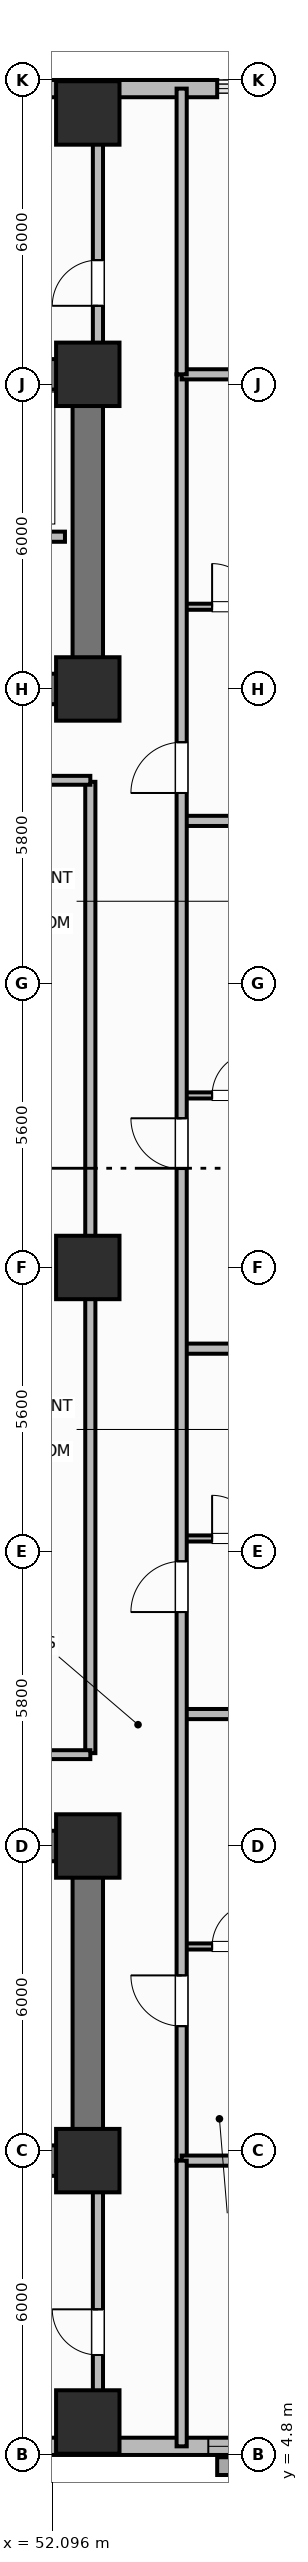
"""IFC4 building model, lengths in metres.
Left out: names, types, materials, properties, quantities, classifications, styles, units other than length and angle.
Written with IfcOpenShell. Run it as: python <this file> out.ifc"""

import sys

from ifc_helpers import new_model, si_unit, direction, frame, frame_2d, origin, origin_2d, place, context, subcontext, project, spatial, rectangle, extrude, element, fill, save


model = new_model("IFC4")
c1 = context("Model", 3, precision=1e-05, world=origin(), true_north=direction((0.0, 1.0)))
c2 = subcontext(c1, "Body", "Model", "MODEL_VIEW")
j1 = project(units=[si_unit("LENGTHUNIT", "METRE"), si_unit("PLANEANGLEUNIT", "RADIAN")], contexts=[c1])
p1 = place(None, origin())
s1 = spatial("IfcSite", under=j1, at=p1, CompositionType="ELEMENT")
p2 = place(p1, origin())
s2 = spatial("IfcBuilding", under=s1, at=p2, CompositionType="ELEMENT")
p3 = place(p2, frame((0.0, 0.0, 58.4)))
s3 = spatial("IfcBuildingStorey", under=s2, at=p3, CompositionType="ELEMENT", Elevation=58.4)
p4 = place(p3, frame((52.8, 10.6, 0.0), z_axis=(0.0, 0.0, 1.0), x_axis=(-1.0, 0.0, 0.0)))
e1 = element("IfcWall", 1, at=p4, inside=s3, PredefinedType="SHEAR", context=c2, shape_type="SweptSolid", body=[
    extrude(rectangle(XDim=27.2, YDim=0.6, at=frame_2d((13.6, 0.0))), origin(), (0.0, 0.0, 1.0), 3.7),
])
p5 = place(p3, frame((52.8, 10.9, 0.0), z_axis=(0.0, 0.0, 1.0), x_axis=(0.0, 1.0, 0.0)))
e2 = element("IfcWall", 2, at=p5, inside=s3, PredefinedType="SHEAR", context=c2, shape_type="SweptSolid", body=[
    extrude(rectangle(XDim=5.6, YDim=0.6, at=frame_2d((2.8, 0.0))), origin(), (0.0, 0.0, 1.0), 3.7),
])
p6 = place(p3, frame((25.6, 16.8, 0.0), z_axis=(0.0, 0.0, 1.0), x_axis=(1.0, 0.0, 0.0)))
e3 = element("IfcWall", 3, at=p6, inside=s3, PredefinedType="SHEAR", context=c2, shape_type="SweptSolid", body=[
    extrude(rectangle(XDim=27.2, YDim=0.6, at=frame_2d((13.6, 0.0))), origin(), (0.0, 0.0, 1.0), 3.7),
])
p7 = place(p6, frame((1.9, 0.0, 0.0)))
e4 = element("IfcOpeningElement", 4, at=p7, cuts=e3, PredefinedType="OPENING", context=c2, shape_type="SweptSolid", body=[
    extrude(rectangle(XDim=1.1, YDim=2.15, at=frame_2d((0.55, 1.075))), frame((0.0, 0.31, 0.0), z_axis=(0.0, -1.0, 0.0), x_axis=(1.0, 0.0, 0.0)), (0.0, 0.0, 1.0), 0.62),
])
p8 = place(p6, frame((13.0, 0.0, 0.0)))
e5 = element("IfcOpeningElement", 5, at=p8, cuts=e3, PredefinedType="OPENING", context=c2, shape_type="SweptSolid", body=[
    extrude(rectangle(XDim=1.2, YDim=2.15, at=frame_2d((0.6, 1.075))), frame((0.0, 0.31, 0.0), z_axis=(0.0, -1.0, 0.0), x_axis=(1.0, 0.0, 0.0)), (0.0, 0.0, 1.0), 0.62),
])
p9 = place(p6, frame((20.4, 0.0, 0.0)))
e6 = element("IfcOpeningElement", 6, at=p9, cuts=e3, PredefinedType="OPENING", context=c2, shape_type="SweptSolid", body=[
    extrude(rectangle(XDim=1.3, YDim=2.2, at=frame_2d((0.65, 1.1))), frame((0.0, 0.31, 0.0), z_axis=(0.0, -1.0, 0.0), x_axis=(1.0, 0.0, 0.0)), (0.0, 0.0, 1.0), 0.62),
])
p10 = place(p6, frame((24.65, 0.0, 0.0)))
e7 = element("IfcOpeningElement", 7, at=p10, cuts=e3, PredefinedType="OPENING", context=c2, shape_type="SweptSolid", body=[
    extrude(rectangle(XDim=0.85, YDim=2.1, at=frame_2d((0.425, 1.05))), frame((0.0, 0.31, 0.0), z_axis=(0.0, -1.0, 0.0), x_axis=(1.0, 0.0, 0.0)), (0.0, 0.0, 1.0), 0.62),
])
p11 = place(p3, frame((25.6, 45.8, 0.0), z_axis=(0.0, 0.0, 1.0), x_axis=(1.0, 0.0, 0.0)))
e8 = element("IfcWall", 8, at=p11, inside=s3, PredefinedType="SHEAR", context=c2, shape_type="SweptSolid", body=[
    extrude(rectangle(XDim=27.2, YDim=0.6, at=frame_2d((13.6, 0.0))), origin(), (0.0, 0.0, 1.0), 3.7),
])
p12 = place(p3, frame((52.8, 39.9, 0.0), z_axis=(0.0, 0.0, 1.0), x_axis=(0.0, 1.0, 0.0)))
e9 = element("IfcWall", 9, at=p12, inside=s3, PredefinedType="SHEAR", context=c2, shape_type="SweptSolid", body=[
    extrude(rectangle(XDim=5.6, YDim=0.6, at=frame_2d((2.8, 0.0))), origin(), (0.0, 0.0, 1.0), 3.7),
])
p13 = place(p3, frame((52.8, 39.6, 0.0), z_axis=(0.0, 0.0, 1.0), x_axis=(-1.0, 0.0, 0.0)))
e10 = element("IfcWall", 10, at=p13, inside=s3, PredefinedType="SHEAR", context=c2, shape_type="SweptSolid", body=[
    extrude(rectangle(XDim=27.2, YDim=0.6, at=frame_2d((13.6, 0.0))), origin(), (0.0, 0.0, 1.0), 3.7),
])
p14 = place(p13, frame((24.2, 0.0, 0.0)))
e11 = element("IfcOpeningElement", 11, at=p14, cuts=e10, PredefinedType="OPENING", context=c2, shape_type="SweptSolid", body=[
    extrude(rectangle(XDim=1.1, YDim=2.15, at=frame_2d((0.55, 1.075))), frame((0.0, 0.31, 0.0), z_axis=(0.0, -1.0, 0.0), x_axis=(1.0, 0.0, 0.0)), (0.0, 0.0, 1.0), 0.62),
])
p15 = place(p13, frame((15.1, 0.0, 0.0)))
e12 = element("IfcOpeningElement", 12, at=p15, cuts=e10, PredefinedType="OPENING", context=c2, shape_type="SweptSolid", body=[
    extrude(rectangle(XDim=1.2, YDim=2.15, at=frame_2d((0.6, 1.075))), frame((0.0, 0.31, 0.0), z_axis=(0.0, -1.0, 0.0), x_axis=(1.0, 0.0, 0.0)), (0.0, 0.0, 1.0), 0.62),
])
p16 = place(p13, frame((11.6, 0.0, 0.0)))
e13 = element("IfcOpeningElement", 13, at=p16, cuts=e10, PredefinedType="OPENING", context=c2, shape_type="SweptSolid", body=[
    extrude(rectangle(XDim=0.9, YDim=2.1, at=frame_2d((0.45, 1.05))), frame((0.0, 0.31, 0.0), z_axis=(0.0, -1.0, 0.0), x_axis=(1.0, 0.0, 0.0)), (0.0, 0.0, 1.0), 0.62),
])
p17 = place(p13, frame((3.6, 0.0, 0.0)))
e14 = element("IfcOpeningElement", 14, at=p17, cuts=e10, PredefinedType="OPENING", context=c2, shape_type="SweptSolid", body=[
    extrude(rectangle(XDim=1.0, YDim=2.15, at=frame_2d((0.5, 1.075))), frame((0.0, 0.31, 0.0), z_axis=(0.0, -1.0, 0.0), x_axis=(1.0, 0.0, 0.0)), (0.0, 0.0, 1.0), 0.62),
])
for number, where, z_axis, x_axis in (
    (15, (52.8, 10.6, 0.0), (0.0, 0.0, 1.0), (1.0, 0.0, 0.0)),
    (16, (52.8, 16.8, 0.0), (0.0, 0.0, 1.0), (1.0, 0.0, 0.0)),
    (17, (52.8, 39.6, 0.0), (0.0, 0.0, 1.0), (1.0, 0.0, 0.0)),
    (18, (52.8, 45.8, 0.0), (0.0, 0.0, 1.0), (1.0, 0.0, 0.0)),
    (19, (52.8, 28.2, 0.0), (0.0, 0.0, 1.0), (1.0, 0.0, 0.0)),
    (20, (52.8, 5.45, 0.0), (0.0, 0.0, 1.0), (1.0, 0.0, 0.0)),
    (21, (52.8, 50.95, 0.0), (0.0, 0.0, 1.0), (1.0, 0.0, 0.0)),
):
    element("IfcColumn", number, at=place(p3, frame(where, z_axis=z_axis, x_axis=x_axis)), inside=s3, PredefinedType="COLUMN", context=c2, shape_type="SweptSolid", body=[
        extrude(rectangle(XDim=1.25, YDim=1.25, at=origin_2d()), origin(), (0.0, 0.0, 1.0), 3.7),
    ])
p18 = place(p3, frame((51.25, 4.97, 0.0), z_axis=(0.0, 0.0, 1.0), x_axis=(1.0, 0.0, 0.0)))
e22 = element("IfcWall", 22, at=p18, inside=s3, PredefinedType="SOLIDWALL", context=c2, shape_type="SweptSolid", body=[
    extrude(rectangle(XDim=8.55, YDim=0.34, at=frame_2d((4.275, 0.0))), origin(), (0.0, 0.0, 1.0), 2.7),
])
p19 = place(p18, frame((3.925, 0.0, 0.68)))
e23 = element("IfcOpeningElement", 23, at=p19, cuts=e22, PredefinedType="OPENING", context=c2, shape_type="SweptSolid", body=[
    extrude(rectangle(XDim=2.1, YDim=1.9, at=frame_2d((1.05, 0.95))), frame((0.0, 0.18, 0.0), z_axis=(0.0, -1.0, 0.0), x_axis=(1.0, 0.0, 0.0)), (0.0, 0.0, 1.0), 0.36),
])
p20 = place(p3, frame((55.35, 51.43, 0.0), z_axis=(0.0, 0.0, 1.0), x_axis=(-1.0, 0.0, 0.0)))
e24 = element("IfcWall", 24, at=p20, inside=s3, PredefinedType="SOLIDWALL", context=c2, shape_type="SweptSolid", body=[
    extrude(rectangle(XDim=12.95, YDim=0.34, at=frame_2d((6.475, 0.0))), origin(), (0.0, 0.0, 1.0), 2.7),
])
p21 = place(p20, frame((5.775, 0.0, 0.73)))
e25 = element("IfcOpeningElement", 25, at=p21, cuts=e24, PredefinedType="OPENING", context=c2, shape_type="SweptSolid", body=[
    extrude(rectangle(XDim=1.4, YDim=1.85, at=frame_2d((0.7, 0.925))), frame((0.0, 0.18, 0.0), z_axis=(0.0, -1.0, 0.0), x_axis=(1.0, 0.0, 0.0)), (0.0, 0.0, 1.0), 0.36),
])
p22 = place(p20, frame((9.308, 0.0, 0.73)))
e26 = element("IfcOpeningElement", 26, at=p22, cuts=e24, PredefinedType="OPENING", context=c2, shape_type="SweptSolid", body=[
    extrude(rectangle(XDim=1.4, YDim=1.85, at=frame_2d((0.7, 0.925))), frame((0.0, 0.18, 0.0), z_axis=(0.0, -1.0, 0.0), x_axis=(1.0, 0.0, 0.0)), (0.0, 0.0, 1.0), 0.36),
])
p23 = place(p3, frame((52.35, 42.6, 0.0), z_axis=(0.0, 0.0, 1.0), x_axis=(-1.0, 0.0, 0.0)))
e27 = element("IfcWall", 27, at=p23, inside=s3, PredefinedType="PARTITIONING", context=c2, shape_type="SweptSolid", body=[
    extrude(rectangle(XDim=8.8, YDim=0.2, at=frame_2d((4.4, 0.0))), origin(), (0.0, 0.0, 1.0), 2.53),
])
p24 = place(p3, frame((52.85, 18.63, 0.0), z_axis=(0.0, 0.0, 1.0), x_axis=(0.0, 1.0, 0.0)))
e28 = element("IfcWall", 28, at=p24, inside=s3, PredefinedType="PARTITIONING", context=c2, shape_type="SweptSolid", body=[
    extrude(rectangle(XDim=19.14, YDim=0.2, at=frame_2d((9.57, 0.0))), origin(), (0.0, 0.0, 1.0), 2.53),
])
for number, where, z_axis, x_axis in (
    (29, (42.75, 18.6, 0.0), (0.0, 0.0, 1.0), (1.0, 0.0, 0.0)),
    (30, (42.75, 37.8, 0.0), (0.0, 0.0, 1.0), (1.0, 0.0, 0.0)),
):
    element("IfcWall", number, at=place(p3, frame(where, z_axis=z_axis, x_axis=x_axis)), inside=s3, PredefinedType="PARTITIONING", context=c2, shape_type="SweptSolid", body=[
        extrude(rectangle(XDim=10.1, YDim=0.175, at=frame_2d((5.05, 0.0))), origin(), (0.0, 0.0, 1.0), 2.53),
    ])
p25 = place(p3, frame((54.65, 14.82, 0.0), z_axis=(0.0, 0.0, 1.0), x_axis=(1.0, 0.0, 0.0)))
e31 = element("IfcWall", 31, at=p25, inside=s3, PredefinedType="PARTITIONING", context=c2, shape_type="SweptSolid", body=[
    extrude(rectangle(XDim=2.25, YDim=0.12, at=frame_2d((1.125, 0.0))), origin(), (0.0, 0.0, 1.0), 2.53),
])
p26 = place(p25, frame((0.6, 0.0, 0.0)))
e32 = element("IfcOpeningElement", 32, at=p26, cuts=e31, PredefinedType="OPENING", context=c2, shape_type="SweptSolid", body=[
    extrude(rectangle(XDim=0.85, YDim=2.1, at=frame_2d((0.425, 1.05))), frame((0.0, 0.07, 0.0), z_axis=(0.0, -1.0, 0.0), x_axis=(1.0, 0.0, 0.0)), (0.0, 0.0, 1.0), 0.14),
])
p27 = place(p3, frame((54.65, 19.4, 0.0), z_axis=(0.0, 0.0, 1.0), x_axis=(1.0, 0.0, 0.0)))
e33 = element("IfcWall", 33, at=p27, inside=s3, PredefinedType="PARTITIONING", context=c2, shape_type="SweptSolid", body=[
    extrude(rectangle(XDim=9.18, YDim=0.2, at=frame_2d((4.59, 0.0))), origin(), (0.0, 0.0, 1.0), 2.53),
])
p28 = place(p3, frame((54.65, 22.86, 0.0), z_axis=(0.0, 0.0, 1.0), x_axis=(1.0, 0.0, 0.0)))
e34 = element("IfcWall", 34, at=p28, inside=s3, PredefinedType="PARTITIONING", context=c2, shape_type="SweptSolid", body=[
    extrude(rectangle(XDim=2.25, YDim=0.12, at=frame_2d((1.125, 0.0))), origin(), (0.0, 0.0, 1.0), 2.53),
])
p29 = place(p28, frame((0.6, 0.0, 0.0)))
e35 = element("IfcOpeningElement", 35, at=p29, cuts=e34, PredefinedType="OPENING", context=c2, shape_type="SweptSolid", body=[
    extrude(rectangle(XDim=0.85, YDim=2.1, at=frame_2d((0.425, 1.05))), frame((0.0, 0.07, 0.0), z_axis=(0.0, -1.0, 0.0), x_axis=(1.0, 0.0, 0.0)), (0.0, 0.0, 1.0), 0.14),
])
p30 = place(p3, frame((54.65, 26.6, 0.0), z_axis=(0.0, 0.0, 1.0), x_axis=(1.0, 0.0, 0.0)))
e36 = element("IfcWall", 36, at=p30, inside=s3, PredefinedType="PARTITIONING", context=c2, shape_type="SweptSolid", body=[
    extrude(rectangle(XDim=8.78, YDim=0.2, at=frame_2d((4.39, 0.0))), origin(), (0.0, 0.0, 1.0), 2.53),
])
p31 = place(p3, frame((54.65, 31.59, 0.0), z_axis=(0.0, 0.0, 1.0), x_axis=(1.0, 0.0, 0.0)))
e37 = element("IfcWall", 37, at=p31, inside=s3, PredefinedType="PARTITIONING", context=c2, shape_type="SweptSolid", body=[
    extrude(rectangle(XDim=2.25, YDim=0.12, at=frame_2d((1.125, 0.0))), origin(), (0.0, 0.0, 1.0), 2.53),
])
p32 = place(p31, frame((0.6, 0.0, 0.0)))
e38 = element("IfcOpeningElement", 38, at=p32, cuts=e37, PredefinedType="OPENING", context=c2, shape_type="SweptSolid", body=[
    extrude(rectangle(XDim=0.85, YDim=2.1, at=frame_2d((0.425, 1.05))), frame((0.0, 0.07, 0.0), z_axis=(0.0, -1.0, 0.0), x_axis=(1.0, 0.0, 0.0)), (0.0, 0.0, 1.0), 0.14),
])
p33 = place(p3, frame((54.65, 37.0, 0.0), z_axis=(0.0, 0.0, 1.0), x_axis=(1.0, 0.0, 0.0)))
e39 = element("IfcWall", 39, at=p33, inside=s3, PredefinedType="PARTITIONING", context=c2, shape_type="SweptSolid", body=[
    extrude(rectangle(XDim=9.18, YDim=0.2, at=frame_2d((4.59, 0.0))), origin(), (0.0, 0.0, 1.0), 2.53),
])
p34 = place(p3, frame((54.65, 41.22, 0.0), z_axis=(0.0, 0.0, 1.0), x_axis=(1.0, 0.0, 0.0)))
e40 = element("IfcWall", 40, at=p34, inside=s3, PredefinedType="PARTITIONING", context=c2, shape_type="SweptSolid", body=[
    extrude(rectangle(XDim=2.25, YDim=0.12, at=frame_2d((1.125, 0.0))), origin(), (0.0, 0.0, 1.0), 2.53),
])
p35 = place(p34, frame((0.6, 0.0, 0.0)))
e41 = element("IfcOpeningElement", 41, at=p35, cuts=e40, PredefinedType="OPENING", context=c2, shape_type="SweptSolid", body=[
    extrude(rectangle(XDim=0.85, YDim=2.1, at=frame_2d((0.425, 1.05))), frame((0.0, 0.07, 0.0), z_axis=(0.0, -1.0, 0.0), x_axis=(1.0, 0.0, 0.0)), (0.0, 0.0, 1.0), 0.14),
])
p36 = place(p3, frame((54.65, 10.6, 0.0), z_axis=(0.0, 0.0, 1.0), x_axis=(0.0, 1.0, 0.0)))
e42 = element("IfcWall", 42, at=p36, inside=s3, PredefinedType="PARTITIONING", context=c2, shape_type="SweptSolid", body=[
    extrude(rectangle(XDim=35.2, YDim=0.2, at=frame_2d((17.6, 0.0))), origin(), (0.0, 0.0, 1.0), 2.53),
])
p37 = place(p36, frame((2.65, 0.0, 0.0)))
e43 = element("IfcOpeningElement", 43, at=p37, cuts=e42, PredefinedType="OPENING", context=c2, shape_type="SweptSolid", body=[
    extrude(rectangle(XDim=1.0, YDim=2.15, at=frame_2d((0.5, 1.075))), frame((0.0, 0.11, 0.0), z_axis=(0.0, -1.0, 0.0), x_axis=(1.0, 0.0, 0.0)), (0.0, 0.0, 1.0), 0.22),
])
p38 = place(p36, frame((10.81, 0.0, 0.0)))
e44 = element("IfcOpeningElement", 44, at=p38, cuts=e42, PredefinedType="OPENING", context=c2, shape_type="SweptSolid", body=[
    extrude(rectangle(XDim=1.0, YDim=2.15, at=frame_2d((0.5, 1.075))), frame((0.0, 0.11, 0.0), z_axis=(0.0, -1.0, 0.0), x_axis=(1.0, 0.0, 0.0)), (0.0, 0.0, 1.0), 0.22),
])
p39 = place(p36, frame((19.54, 0.0, 0.0)))
e45 = element("IfcOpeningElement", 45, at=p39, cuts=e42, PredefinedType="OPENING", context=c2, shape_type="SweptSolid", body=[
    extrude(rectangle(XDim=1.0, YDim=2.15, at=frame_2d((0.5, 1.075))), frame((0.0, 0.11, 0.0), z_axis=(0.0, -1.0, 0.0), x_axis=(1.0, 0.0, 0.0)), (0.0, 0.0, 1.0), 0.22),
])
p40 = place(p36, frame((26.95, 0.0, 0.0)))
e46 = element("IfcOpeningElement", 46, at=p40, cuts=e42, PredefinedType="OPENING", context=c2, shape_type="SweptSolid", body=[
    extrude(rectangle(XDim=1.0, YDim=2.15, at=frame_2d((0.5, 1.075))), frame((0.0, 0.11, 0.0), z_axis=(0.0, -1.0, 0.0), x_axis=(1.0, 0.0, 0.0)), (0.0, 0.0, 1.0), 0.22),
])
for number, where, z_axis, x_axis in (
    (47, (54.65, 10.6, 0.0), (0.0, 0.0, 1.0), (1.0, 0.0, 0.0)),
    (48, (54.65, 45.8, 0.0), (0.0, 0.0, 1.0), (1.0, 0.0, 0.0)),
):
    element("IfcWall", number, at=place(p3, frame(where, z_axis=z_axis, x_axis=x_axis)), inside=s3, PredefinedType="PARTITIONING", context=c2, shape_type="SweptSolid", body=[
        extrude(rectangle(XDim=8.76, YDim=0.2, at=frame_2d((4.38, 0.0))), origin(), (0.0, 0.0, 1.0), 2.53),
    ])
p41 = place(p3, frame((54.65, 4.97, 0.0), z_axis=(0.0, 0.0, 1.0), x_axis=(0.0, 1.0, 0.0)))
e49 = element("IfcWall", 49, at=p41, inside=s3, PredefinedType="PARTITIONING", context=c2, shape_type="SweptSolid", body=[
    extrude(rectangle(XDim=5.63, YDim=0.2, at=frame_2d((2.815, 0.0))), origin(), (0.0, 0.0, 1.0), 2.53),
])
p42 = place(p3, frame((54.65, 45.8, 0.0), z_axis=(0.0, 0.0, 1.0), x_axis=(0.0, 1.0, 0.0)))
e50 = element("IfcWall", 50, at=p42, inside=s3, PredefinedType="PARTITIONING", context=c2, shape_type="SweptSolid", body=[
    extrude(rectangle(XDim=5.63, YDim=0.2, at=frame_2d((2.815, 0.0))), origin(), (0.0, 0.0, 1.0), 2.53),
])
p43 = place(p3, frame((53.0, 5.72, 0.0), z_axis=(0.0, 0.0, 1.0), x_axis=(0.0, 1.0, 0.0)))
e51 = element("IfcWall", 51, at=p43, inside=s3, PredefinedType="PARTITIONING", context=c2, shape_type="SweptSolid", body=[
    extrude(rectangle(XDim=4.58, YDim=0.2, at=frame_2d((2.29, 0.0))), origin(), (0.0, 0.0, 1.0), 2.53),
])
p44 = place(p43, frame((1.05, 0.0, 0.0)))
e52 = element("IfcOpeningElement", 52, at=p44, cuts=e51, PredefinedType="OPENING", context=c2, shape_type="SweptSolid", body=[
    extrude(rectangle(XDim=0.9, YDim=2.1, at=frame_2d((0.45, 1.05))), frame((0.0, 0.11, 0.0), z_axis=(0.0, -1.0, 0.0), x_axis=(1.0, 0.0, 0.0)), (0.0, 0.0, 1.0), 0.22),
])
p45 = place(p3, frame((53.0, 46.1, 0.0), z_axis=(0.0, 0.0, 1.0), x_axis=(0.0, 1.0, 0.0)))
e53 = element("IfcWall", 53, at=p45, inside=s3, PredefinedType="PARTITIONING", context=c2, shape_type="SweptSolid", body=[
    extrude(rectangle(XDim=4.58, YDim=0.2, at=frame_2d((2.29, 0.0))), origin(), (0.0, 0.0, 1.0), 2.53),
])
p46 = place(p45, frame((1.05, 0.0, 0.0)))
e54 = element("IfcOpeningElement", 54, at=p46, cuts=e53, PredefinedType="OPENING", context=c2, shape_type="SweptSolid", body=[
    extrude(rectangle(XDim=0.9, YDim=2.1, at=frame_2d((0.45, 1.05))), frame((0.0, 0.11, 0.0), z_axis=(0.0, -1.0, 0.0), x_axis=(1.0, 0.0, 0.0)), (0.0, 0.0, 1.0), 0.22),
])
p47 = place(p19, origin())
e55 = element("IfcWindow", 55, at=p47, inside=s3, PartitioningType="SINGLE_PANEL", PredefinedType="WINDOW", context=c2, shape_type="SweptSolid", body=[
    extrude(rectangle(XDim=2.1, YDim=1.9, at=frame_2d((1.05, 0.95))), frame((0.0, 0.03, 0.0), z_axis=(0.0, -1.0, 0.0), x_axis=(1.0, 0.0, 0.0)), (0.0, 0.0, 1.0), 0.06),
])
fill(e23, e55)
p48 = place(p26, origin())
e56 = element("IfcDoor", 56, at=p48, inside=s3, OperationType="SINGLE_SWING_RIGHT", PredefinedType="DOOR", context=c2, shape_type="SweptSolid", body=[
    extrude(rectangle(XDim=0.85, YDim=2.1, at=frame_2d((0.425, 1.05))), frame((0.0, 0.025, 0.0), z_axis=(0.0, -1.0, 0.0), x_axis=(1.0, 0.0, 0.0)), (0.0, 0.0, 1.0), 0.05),
])
fill(e32, e56)
p49 = place(p29, origin())
e57 = element("IfcDoor", 57, at=p49, inside=s3, OperationType="SINGLE_SWING_LEFT", PredefinedType="DOOR", context=c2, shape_type="SweptSolid", body=[
    extrude(rectangle(XDim=0.85, YDim=2.1, at=frame_2d((0.425, 1.05))), frame((0.0, 0.025, 0.0), z_axis=(0.0, -1.0, 0.0), x_axis=(1.0, 0.0, 0.0)), (0.0, 0.0, 1.0), 0.05),
])
fill(e35, e57)
p50 = place(p32, origin())
e58 = element("IfcDoor", 58, at=p50, inside=s3, OperationType="SINGLE_SWING_RIGHT", PredefinedType="DOOR", context=c2, shape_type="SweptSolid", body=[
    extrude(rectangle(XDim=0.85, YDim=2.1, at=frame_2d((0.425, 1.05))), frame((0.0, 0.025, 0.0), z_axis=(0.0, -1.0, 0.0), x_axis=(1.0, 0.0, 0.0)), (0.0, 0.0, 1.0), 0.05),
])
fill(e38, e58)
p51 = place(p35, origin())
e59 = element("IfcDoor", 59, at=p51, inside=s3, OperationType="SINGLE_SWING_LEFT", PredefinedType="DOOR", context=c2, shape_type="SweptSolid", body=[
    extrude(rectangle(XDim=0.85, YDim=2.1, at=frame_2d((0.425, 1.05))), frame((0.0, 0.025, 0.0), z_axis=(0.0, -1.0, 0.0), x_axis=(1.0, 0.0, 0.0)), (0.0, 0.0, 1.0), 0.05),
])
fill(e41, e59)
p52 = place(p37, origin())
e60 = element("IfcDoor", 60, at=p52, inside=s3, OperationType="SINGLE_SWING_RIGHT", PredefinedType="DOOR", context=c2, shape_type="SweptSolid", body=[
    extrude(rectangle(XDim=1.0, YDim=2.15, at=frame_2d((0.5, 1.075))), frame((0.0, 0.025, 0.0), z_axis=(0.0, -1.0, 0.0), x_axis=(1.0, 0.0, 0.0)), (0.0, 0.0, 1.0), 0.05),
])
fill(e43, e60)
p53 = place(p38, origin())
e61 = element("IfcDoor", 61, at=p53, inside=s3, OperationType="SINGLE_SWING_LEFT", PredefinedType="DOOR", context=c2, shape_type="SweptSolid", body=[
    extrude(rectangle(XDim=1.0, YDim=2.15, at=frame_2d((0.5, 1.075))), frame((0.0, 0.025, 0.0), z_axis=(0.0, -1.0, 0.0), x_axis=(1.0, 0.0, 0.0)), (0.0, 0.0, 1.0), 0.05),
])
fill(e44, e61)
p54 = place(p39, origin())
e62 = element("IfcDoor", 62, at=p54, inside=s3, OperationType="SINGLE_SWING_RIGHT", PredefinedType="DOOR", context=c2, shape_type="SweptSolid", body=[
    extrude(rectangle(XDim=1.0, YDim=2.15, at=frame_2d((0.5, 1.075))), frame((0.0, 0.025, 0.0), z_axis=(0.0, -1.0, 0.0), x_axis=(1.0, 0.0, 0.0)), (0.0, 0.0, 1.0), 0.05),
])
fill(e45, e62)
p55 = place(p40, origin())
e63 = element("IfcDoor", 63, at=p55, inside=s3, OperationType="SINGLE_SWING_LEFT", PredefinedType="DOOR", context=c2, shape_type="SweptSolid", body=[
    extrude(rectangle(XDim=1.0, YDim=2.15, at=frame_2d((0.5, 1.075))), frame((0.0, 0.025, 0.0), z_axis=(0.0, -1.0, 0.0), x_axis=(1.0, 0.0, 0.0)), (0.0, 0.0, 1.0), 0.05),
])
fill(e46, e63)
p56 = place(p44, origin())
e64 = element("IfcDoor", 64, at=p56, inside=s3, OperationType="SINGLE_SWING_RIGHT", PredefinedType="DOOR", context=c2, shape_type="SweptSolid", body=[
    extrude(rectangle(XDim=0.9, YDim=2.1, at=frame_2d((0.45, 1.05))), frame((0.0, 0.025, 0.0), z_axis=(0.0, -1.0, 0.0), x_axis=(1.0, 0.0, 0.0)), (0.0, 0.0, 1.0), 0.05),
])
fill(e52, e64)
p57 = place(p46, origin())
e65 = element("IfcDoor", 65, at=p57, inside=s3, OperationType="SINGLE_SWING_LEFT", PredefinedType="DOOR", context=c2, shape_type="SweptSolid", body=[
    extrude(rectangle(XDim=0.9, YDim=2.1, at=frame_2d((0.45, 1.05))), frame((0.0, 0.025, 0.0), z_axis=(0.0, -1.0, 0.0), x_axis=(1.0, 0.0, 0.0)), (0.0, 0.0, 1.0), 0.05),
])
fill(e54, e65)
save(model, sys.argv[1])
